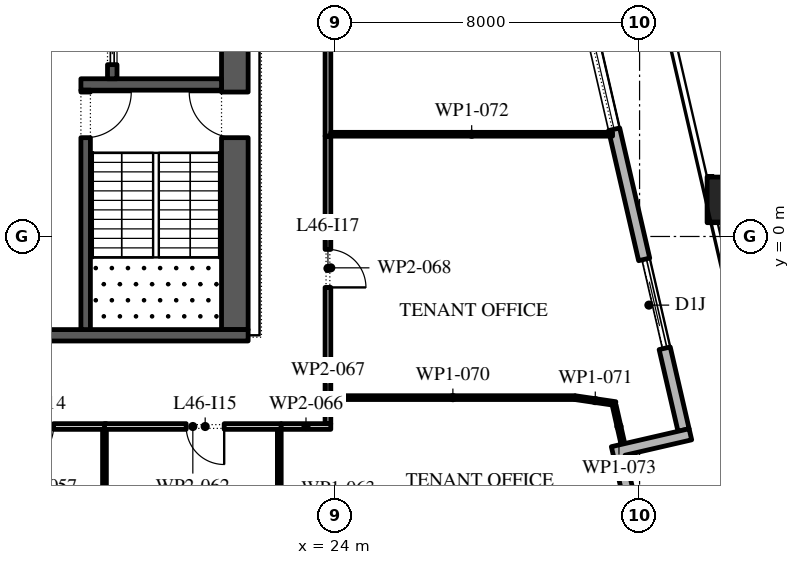
"""IFC4 building model, lengths in metres.
Left out: names, types, materials, properties, quantities, classifications, styles, units other than length and angle.
Written with IfcOpenShell. Run it as: python <this file> out.ifc"""

import sys

from ifc_helpers import new_model, si_unit, direction, frame, frame_2d, origin, origin_2d, place, context, subcontext, project, spatial, polyline, rectangle, outline, extrude, element, fill, save


model = new_model("IFC4")
c1 = context("Model", 3, precision=1e-05, world=origin(), true_north=direction((0.0, 1.0)))
c2 = subcontext(c1, "Body", "Model", "MODEL_VIEW")
j1 = project(units=[si_unit("LENGTHUNIT", "METRE"), si_unit("PLANEANGLEUNIT", "RADIAN")], contexts=[c1])
p1 = place(None, origin())
s1 = spatial("IfcSite", under=j1, at=p1, CompositionType="ELEMENT")
p2 = place(p1, origin())
s2 = spatial("IfcBuilding", under=s1, at=p2, CompositionType="ELEMENT")
p3 = place(p2, frame((0.0, 0.0, 209.4)))
s3 = spatial("IfcBuildingStorey", under=s2, at=p3, CompositionType="ELEMENT", Elevation=209.4)
p4 = place(p3, frame((34.376, 0.963, 0.0), z_axis=(-0.002673604768, 0.011682490397, 0.999928183049), x_axis=(-0.974798272484, -0.223088161862, 0.0)))
e1 = element("IfcColumn", 1, at=p4, inside=s3, PredefinedType="COLUMN", context=c2, shape_type="SweptSolid", body=[
    extrude(rectangle(XDim=1.2, YDim=1.2, at=origin_2d()), origin(), (0.0, 0.0, 1.0), 4.2),
])
p5 = place(p3, frame((33.157, -5.092, 0.0), z_axis=(0.0, 0.0, 1.0), x_axis=(-0.224950279389, 0.974370243697, 0.0)))
e2 = element("IfcWall", 2, at=p5, inside=s3, PredefinedType="STANDARD", context=c2, shape_type="SweptSolid", body=[
    extrude(rectangle(XDim=49.5, YDim=0.3, at=frame_2d((24.75, 0.0))), origin(), (0.0, 0.0, 1.0), 4.0),
])
p6 = place(p5, frame((2.207, 0.0, 0.0)))
e3 = element("IfcOpeningElement", 3, at=p6, cuts=e2, PredefinedType="OPENING", context=c2, shape_type="SweptSolid", body=[
    extrude(rectangle(XDim=2.4, YDim=3.125, at=frame_2d((1.2, 1.562))), frame((0.0, 0.16, 0.0), z_axis=(0.0, -1.0, 0.0), x_axis=(1.0, 0.0, 0.0)), (0.0, 0.0, 1.0), 0.32),
])
p7 = place(p5, frame((8.121, 0.0, 0.45)))
e4 = element("IfcOpeningElement", 4, at=p7, cuts=e2, PredefinedType="OPENING", context=c2, shape_type="SweptSolid", body=[
    extrude(rectangle(XDim=4.5, YDim=2.875, at=frame_2d((2.25, 1.438))), frame((0.0, 0.16, 0.0), z_axis=(0.0, -1.0, 0.0), x_axis=(1.0, 0.0, 0.0)), (0.0, 0.0, 1.0), 0.32),
])
p8 = place(p5, frame((15.236, 0.0, 0.45)))
e5 = element("IfcOpeningElement", 5, at=p8, cuts=e2, PredefinedType="OPENING", context=c2, shape_type="SweptSolid", body=[
    extrude(rectangle(XDim=4.5, YDim=2.875, at=frame_2d((2.25, 1.438))), frame((0.0, 0.16, 0.0), z_axis=(0.0, -1.0, 0.0), x_axis=(1.0, 0.0, 0.0)), (0.0, 0.0, 1.0), 0.32),
])
p9 = place(p5, frame((22.35, 0.0, 0.45)))
e6 = element("IfcOpeningElement", 6, at=p9, cuts=e2, PredefinedType="OPENING", context=c2, shape_type="SweptSolid", body=[
    extrude(rectangle(XDim=4.5, YDim=3.0, at=frame_2d((2.25, 1.5))), frame((0.0, 0.16, 0.0), z_axis=(0.0, -1.0, 0.0), x_axis=(1.0, 0.0, 0.0)), (0.0, 0.0, 1.0), 0.32),
])
p10 = place(p5, frame((30.514, 0.0, 0.0)))
e7 = element("IfcOpeningElement", 7, at=p10, cuts=e2, PredefinedType="OPENING", context=c2, shape_type="SweptSolid", body=[
    extrude(rectangle(XDim=2.4, YDim=3.45, at=frame_2d((1.2, 1.725))), frame((0.0, 0.16, 0.0), z_axis=(0.0, -1.0, 0.0), x_axis=(1.0, 0.0, 0.0)), (0.0, 0.0, 1.0), 0.32),
])
p11 = place(p5, frame((36.579, 0.0, 0.45)))
e8 = element("IfcOpeningElement", 8, at=p11, cuts=e2, PredefinedType="OPENING", context=c2, shape_type="SweptSolid", body=[
    extrude(rectangle(XDim=4.5, YDim=3.05, at=frame_2d((2.25, 1.525))), frame((0.0, 0.16, 0.0), z_axis=(0.0, -1.0, 0.0), x_axis=(1.0, 0.0, 0.0)), (0.0, 0.0, 1.0), 0.32),
])
p12 = place(p5, frame((43.693, 0.0, 0.45)))
e9 = element("IfcOpeningElement", 9, at=p12, cuts=e2, PredefinedType="OPENING", context=c2, shape_type="SweptSolid", body=[
    extrude(rectangle(XDim=4.5, YDim=3.05, at=frame_2d((2.25, 1.525))), frame((0.0, 0.16, 0.0), z_axis=(0.0, -1.0, 0.0), x_axis=(1.0, 0.0, 0.0)), (0.0, 0.0, 1.0), 0.32),
])
p13 = place(p3, origin())
e10 = element("IfcWall", 10, at=p13, inside=s3, PredefinedType="STANDARD", context=c2, shape_type="SweptSolid", body=[
    extrude(outline(polyline([(31.662, -7.285), (31.257, -5.531), (33.303, -5.058), (33.371, -5.351), (31.617, -5.756), (32.022, -7.51), (30.268, -7.914), (30.605, -9.376), (30.313, -9.443), (29.908, -7.69), (31.662, -7.285)])), origin(), (0.0, 0.0, 1.0), 4.0),
])
p14 = place(p3, frame((21.35, -2.45, 0.0), z_axis=(0.0, 0.0, 1.0), x_axis=(0.0, 1.0, 0.0)))
e11 = element("IfcWall", 11, at=p14, inside=s3, PredefinedType="SHEAR", context=c2, shape_type="SweptSolid", body=[
    extrude(rectangle(XDim=27.9, YDim=0.7, at=frame_2d((13.95, 0.0))), origin(), (0.0, 0.0, 1.0), 4.0),
])
p15 = place(p14, frame((5.05, 0.0, 0.0)))
e12 = element("IfcOpeningElement", 12, at=p15, cuts=e11, PredefinedType="OPENING", context=c2, shape_type="SweptSolid", body=[
    extrude(rectangle(XDim=1.2, YDim=2.1, at=frame_2d((0.6, 1.05))), frame((0.0, 0.36, 0.0), z_axis=(0.0, -1.0, 0.0), x_axis=(1.0, 0.0, 0.0)), (0.0, 0.0, 1.0), 0.72),
])
p16 = place(p14, frame((21.65, 0.0, 0.0)))
e13 = element("IfcOpeningElement", 13, at=p16, cuts=e11, PredefinedType="OPENING", context=c2, shape_type="SweptSolid", body=[
    extrude(rectangle(XDim=1.2, YDim=2.1, at=frame_2d((0.6, 1.05))), frame((0.0, 0.36, 0.0), z_axis=(0.0, -1.0, 0.0), x_axis=(1.0, 0.0, 0.0)), (0.0, 0.0, 1.0), 0.72),
])
p17 = place(p3, frame((10.3, -2.6, 0.0), z_axis=(0.0, 0.0, 1.0), x_axis=(1.0, 0.0, 0.0)))
e14 = element("IfcWall", 14, at=p17, inside=s3, PredefinedType="SHEAR", context=c2, shape_type="SweptSolid", body=[
    extrude(rectangle(XDim=11.4, YDim=0.3, at=frame_2d((5.7, 0.0))), origin(), (0.0, 0.0, 1.0), 4.0),
])
p18 = place(p3, frame((17.3, 4.0, 0.0), z_axis=(0.0, 0.0, 1.0), x_axis=(1.0, 0.0, 0.0)))
e15 = element("IfcWall", 15, at=p18, inside=s3, PredefinedType="SHEAR", context=c2, shape_type="SweptSolid", body=[
    extrude(rectangle(XDim=3.7, YDim=0.3, at=frame_2d((1.85, 0.0))), origin(), (0.0, 0.0, 1.0), 4.0),
])
p19 = place(p3, frame((17.425, -2.45, 0.0), z_axis=(0.0, 0.0, 1.0), x_axis=(0.0, 1.0, 0.0)))
e16 = element("IfcWall", 16, at=p19, inside=s3, PredefinedType="SHEAR", context=c2, shape_type="SweptSolid", body=[
    extrude(rectangle(XDim=6.3, YDim=0.25, at=frame_2d((3.15, 0.0))), origin(), (0.0, 0.0, 1.0), 4.0),
])
p20 = place(p19, frame((5.05, 0.0, 0.0)))
e17 = element("IfcOpeningElement", 17, at=p20, cuts=e16, PredefinedType="OPENING", context=c2, shape_type="SweptSolid", body=[
    extrude(rectangle(XDim=1.2, YDim=2.1, at=frame_2d((0.6, 1.05))), frame((0.0, 0.135, 0.0), z_axis=(0.0, -1.0, 0.0), x_axis=(1.0, 0.0, 0.0)), (0.0, 0.0, 1.0), 0.27),
])
p21 = place(p3, frame((18.125, 4.15, 0.0), z_axis=(0.0, 0.0, 1.0), x_axis=(0.0, 1.0, 0.0)))
e18 = element("IfcWall", 18, at=p21, inside=s3, PredefinedType="SHEAR", context=c2, shape_type="SweptSolid", body=[
    extrude(rectangle(XDim=14.7, YDim=0.25, at=frame_2d((7.35, 0.0))), origin(), (0.0, 0.0, 1.0), 4.0),
])
p22 = place(p21, frame((3.446, 0.0, 0.0)))
e19 = element("IfcOpeningElement", 19, at=p22, cuts=e18, PredefinedType="OPENING", context=c2, shape_type="SweptSolid", body=[
    extrude(rectangle(XDim=0.9, YDim=2.1, at=frame_2d((0.45, 1.05))), frame((0.0, 0.135, 0.0), z_axis=(0.0, -1.0, 0.0), x_axis=(1.0, 0.0, 0.0)), (0.0, 0.0, 1.0), 0.27),
])
p23 = place(p21, frame((6.9, 0.0, 0.0)))
e20 = element("IfcOpeningElement", 20, at=p23, cuts=e18, PredefinedType="OPENING", context=c2, shape_type="SweptSolid", body=[
    extrude(rectangle(XDim=0.9, YDim=2.1, at=frame_2d((0.45, 1.05))), frame((0.0, 0.135, 0.0), z_axis=(0.0, -1.0, 0.0), x_axis=(1.0, 0.0, 0.0)), (0.0, 0.0, 1.0), 0.27),
])
p24 = place(p21, frame((10.354, 0.0, 0.0)))
e21 = element("IfcOpeningElement", 21, at=p24, cuts=e18, PredefinedType="OPENING", context=c2, shape_type="SweptSolid", body=[
    extrude(rectangle(XDim=0.9, YDim=2.1, at=frame_2d((0.45, 1.05))), frame((0.0, 0.135, 0.0), z_axis=(0.0, -1.0, 0.0), x_axis=(1.0, 0.0, 0.0)), (0.0, 0.0, 1.0), 0.27),
])
p25 = place(p21, frame((0.371, 0.0, 0.0)))
e22 = element("IfcOpeningElement", 22, at=p25, cuts=e18, PredefinedType="OPENING", context=c2, shape_type="SweptSolid", body=[
    extrude(rectangle(XDim=1.1, YDim=2.1, at=frame_2d((0.55, 1.05))), frame((0.0, 0.135, 0.0), z_axis=(0.0, -1.0, 0.0), x_axis=(1.0, 0.0, 0.0)), (0.0, 0.0, 1.0), 0.27),
])
p26 = place(p21, frame((13.229, 0.0, 0.0)))
e23 = element("IfcOpeningElement", 23, at=p26, cuts=e18, PredefinedType="OPENING", context=c2, shape_type="SweptSolid", body=[
    extrude(rectangle(XDim=1.1, YDim=2.1, at=frame_2d((0.55, 1.05))), frame((0.0, 0.135, 0.0), z_axis=(0.0, -1.0, 0.0), x_axis=(1.0, 0.0, 0.0)), (0.0, 0.0, 1.0), 0.27),
])
p27 = place(p3, frame((17.97, -5.0, 0.0), z_axis=(0.0, 0.0, 1.0), x_axis=(-1.0, 0.0, 0.0)))
e24 = element("IfcWall", 24, at=p27, inside=s3, PredefinedType="PARTITIONING", context=c2, shape_type="SweptSolid", body=[
    extrude(rectangle(XDim=3.49, YDim=0.15, at=frame_2d((1.745, 0.0))), origin(), (0.0, 0.0, 1.0), 4.0),
])
p28 = place(p27, frame((1.39, 0.0, 0.0)))
e25 = element("IfcOpeningElement", 25, at=p28, cuts=e24, PredefinedType="OPENING", context=c2, shape_type="SweptSolid", body=[
    extrude(rectangle(XDim=1.0, YDim=2.1, at=frame_2d((0.5, 1.05))), frame((0.0, 0.085, 0.0), z_axis=(0.0, -1.0, 0.0), x_axis=(1.0, 0.0, 0.0)), (0.0, 0.0, 1.0), 0.17),
])
p29 = place(p3, frame((17.92, -5.075, 0.0), z_axis=(0.0, 0.0, 1.0), x_axis=(0.0, -1.0, 0.0)))
e26 = element("IfcWall", 26, at=p29, inside=s3, PredefinedType="PARTITIONING", context=c2, shape_type="SweptSolid", body=[
    extrude(rectangle(XDim=7.312, YDim=0.1, at=frame_2d((3.656, 0.0))), origin(), (0.0, 0.0, 1.0), 4.0),
])
p30 = place(p3, frame((22.57, -5.0, 0.0), z_axis=(0.0, 0.0, 1.0), x_axis=(-1.0, 0.0, 0.0)))
e27 = element("IfcWall", 27, at=p30, inside=s3, PredefinedType="PARTITIONING", context=c2, shape_type="SweptSolid", body=[
    extrude(rectangle(XDim=4.65, YDim=0.15, at=frame_2d((2.325, 0.0))), origin(), (0.0, 0.0, 1.0), 4.0),
])
p31 = place(p30, frame((1.5, 0.0, 0.0)))
e28 = element("IfcOpeningElement", 28, at=p31, cuts=e27, PredefinedType="OPENING", context=c2, shape_type="SweptSolid", body=[
    extrude(rectangle(XDim=1.0, YDim=2.1, at=frame_2d((0.5, 1.05))), frame((0.0, 0.085, 0.0), z_axis=(0.0, -1.0, 0.0), x_axis=(1.0, 0.0, 0.0)), (0.0, 0.0, 1.0), 0.17),
])
p32 = place(p3, frame((22.52, -5.075, 0.0), z_axis=(0.0, 0.0, 1.0), x_axis=(0.0, -1.0, 0.0)))
e29 = element("IfcWall", 29, at=p32, inside=s3, PredefinedType="PARTITIONING", context=c2, shape_type="SweptSolid", body=[
    extrude(rectangle(XDim=6.25, YDim=0.1, at=frame_2d((3.125, 0.0))), origin(), (0.0, 0.0, 1.0), 4.0),
])
p33 = place(p32, frame((4.125, 0.0, 0.0)))
e30 = element("IfcOpeningElement", 30, at=p33, cuts=e29, PredefinedType="OPENING", context=c2, shape_type="SweptSolid", body=[
    extrude(rectangle(XDim=0.9, YDim=2.1, at=frame_2d((0.45, 1.05))), frame((0.0, 0.06, 0.0), z_axis=(0.0, -1.0, 0.0), x_axis=(1.0, 0.0, 0.0)), (0.0, 0.0, 1.0), 0.12),
])
p34 = place(p3, frame((23.875, -5.0, 0.0), z_axis=(0.0, 0.0, 1.0), x_axis=(-1.0, 0.0, 0.0)))
e31 = element("IfcWall", 31, at=p34, inside=s3, PredefinedType="PARTITIONING", context=c2, shape_type="SweptSolid", body=[
    extrude(rectangle(XDim=1.305, YDim=0.15, at=frame_2d((0.652, 0.0))), origin(), (0.0, 0.0, 1.0), 4.0),
])
p35 = place(p3, frame((23.8, -4.29, 0.0), z_axis=(0.0, 0.0, 1.0), x_axis=(0.0, -1.0, 0.0)))
e32 = element("IfcWall", 32, at=p35, inside=s3, PredefinedType="PARTITIONING", context=c2, shape_type="SweptSolid", body=[
    extrude(rectangle(XDim=0.635, YDim=0.15, at=frame_2d((0.317, 0.0))), origin(), (0.0, 0.0, 1.0), 4.0),
])
p36 = place(p3, frame((23.8, 2.64, 0.0), z_axis=(0.0, 0.0, 1.0), x_axis=(0.0, -1.0, 0.0)))
e33 = element("IfcWall", 33, at=p36, inside=s3, PredefinedType="PARTITIONING", context=c2, shape_type="SweptSolid", body=[
    extrude(rectangle(XDim=6.93, YDim=0.15, at=frame_2d((3.465, 0.0))), origin(), (0.0, 0.0, 1.0), 4.0),
])
p37 = place(p36, frame((2.98, 0.0, 0.0)))
e34 = element("IfcOpeningElement", 34, at=p37, cuts=e33, PredefinedType="OPENING", context=c2, shape_type="SweptSolid", body=[
    extrude(rectangle(XDim=1.0, YDim=2.1, at=frame_2d((0.5, 1.05))), frame((0.0, 0.085, 0.0), z_axis=(0.0, -1.0, 0.0), x_axis=(1.0, 0.0, 0.0)), (0.0, 0.0, 1.0), 0.17),
])
p38 = place(p3, frame((23.8, 27.2, 0.0), z_axis=(0.0, 0.0, 1.0), x_axis=(0.0, -1.0, 0.0)))
e35 = element("IfcWall", 35, at=p38, inside=s3, PredefinedType="PARTITIONING", context=c2, shape_type="SweptSolid", body=[
    extrude(rectangle(XDim=24.56, YDim=0.15, at=frame_2d((12.28, 0.0))), origin(), (0.0, 0.0, 1.0), 4.0),
])
p39 = place(p38, frame((14.11, 0.0, 0.0)))
e36 = element("IfcOpeningElement", 36, at=p39, cuts=e35, PredefinedType="OPENING", context=c2, shape_type="SweptSolid", body=[
    extrude(rectangle(XDim=1.0, YDim=2.1, at=frame_2d((0.5, 1.05))), frame((0.0, 0.085, 0.0), z_axis=(0.0, -1.0, 0.0), x_axis=(1.0, 0.0, 0.0)), (0.0, 0.0, 1.0), 0.17),
])
p40 = place(p3, frame((30.3, -4.24, 0.0), z_axis=(0.0, 0.0, 1.0), x_axis=(-1.0, 0.0, 0.0)))
e37 = element("IfcWall", 37, at=p40, inside=s3, PredefinedType="PARTITIONING", context=c2, shape_type="SweptSolid", body=[
    extrude(rectangle(XDim=6.425, YDim=0.1, at=frame_2d((3.212, 0.0))), origin(), (0.0, 0.0, 1.0), 4.0),
])
p41 = place(p3, frame((31.369, -4.397, 0.0), z_axis=(0.0, 0.0, 1.0), x_axis=(-0.989385908309, 0.145311817963, 0.0)))
e38 = element("IfcWall", 38, at=p41, inside=s3, PredefinedType="PARTITIONING", context=c2, shape_type="SweptSolid", body=[
    extrude(rectangle(XDim=1.08, YDim=0.1, at=frame_2d((0.54, 0.0))), origin(), (0.0, 0.0, 1.0), 4.0),
])
p42 = place(p3, frame((31.289, 2.69, 0.0), z_axis=(0.0, 0.0, 1.0), x_axis=(-1.0, 0.0, 0.0)))
e39 = element("IfcWall", 39, at=p42, inside=s3, PredefinedType="PARTITIONING", context=c2, shape_type="SweptSolid", body=[
    extrude(rectangle(XDim=7.414, YDim=0.1, at=frame_2d((3.707, 0.0))), origin(), (0.0, 0.0, 1.0), 4.0),
])
p43 = place(p3, frame((31.584, -5.558, 0.0), z_axis=(0.0, 0.0, 1.0), x_axis=(-0.220443734992, 0.975399692281, 0.0)))
e40 = element("IfcWall", 40, at=p43, inside=s3, PredefinedType="PARTITIONING", context=c2, shape_type="SweptSolid", body=[
    extrude(rectangle(XDim=1.147, YDim=0.1, at=frame_2d((0.574, 0.0))), origin(), (0.0, 0.0, 1.0), 4.0),
])
p44 = place(p6, origin())
e41 = element("IfcDoor", 41, at=p44, inside=s3, OperationType="DOUBLE_DOOR_SLIDING", PredefinedType="DOOR", context=c2, shape_type="SweptSolid", body=[
    extrude(rectangle(XDim=2.4, YDim=3.125, at=frame_2d((1.2, 1.562))), frame((0.0, 0.025, 0.0), z_axis=(0.0, -1.0, 0.0), x_axis=(1.0, 0.0, 0.0)), (0.0, 0.0, 1.0), 0.05),
])
fill(e3, e41)
p45 = place(p7, origin())
e42 = element("IfcWindow", 42, at=p45, inside=s3, PartitioningType="DOUBLE_PANEL_VERTICAL", PredefinedType="WINDOW", context=c2, shape_type="SweptSolid", body=[
    extrude(rectangle(XDim=4.5, YDim=2.875, at=frame_2d((2.25, 1.438))), frame((0.0, 0.03, 0.0), z_axis=(0.0, -1.0, 0.0), x_axis=(1.0, 0.0, 0.0)), (0.0, 0.0, 1.0), 0.06),
])
fill(e4, e42)
p46 = place(p25, origin())
e43 = element("IfcDoor", 43, at=p46, inside=s3, OperationType="SLIDING_TO_LEFT", PredefinedType="DOOR", context=c2, shape_type="SweptSolid", body=[
    extrude(rectangle(XDim=1.1, YDim=2.1, at=frame_2d((0.55, 1.05))), frame((0.0, 0.025, 0.0), z_axis=(0.0, -1.0, 0.0), x_axis=(1.0, 0.0, 0.0)), (0.0, 0.0, 1.0), 0.05),
])
fill(e22, e43)
p47 = place(p20, frame((1.2, 0.0, 0.0), z_axis=(0.0, 0.0, 1.0), x_axis=(-1.0, 0.0, 0.0)))
e44 = element("IfcDoor", 44, at=p47, inside=s3, OperationType="SINGLE_SWING_RIGHT", PredefinedType="DOOR", context=c2, shape_type="SweptSolid", body=[
    extrude(rectangle(XDim=1.2, YDim=2.1, at=frame_2d((0.6, 1.05))), frame((0.0, 0.025, 0.0), z_axis=(0.0, -1.0, 0.0), x_axis=(1.0, 0.0, 0.0)), (0.0, 0.0, 1.0), 0.05),
])
fill(e17, e44)
p48 = place(p15, origin())
e45 = element("IfcDoor", 45, at=p48, inside=s3, OperationType="SINGLE_SWING_LEFT", PredefinedType="DOOR", context=c2, shape_type="SweptSolid", body=[
    extrude(rectangle(XDim=1.2, YDim=2.1, at=frame_2d((0.6, 1.05))), frame((0.0, 0.025, 0.0), z_axis=(0.0, -1.0, 0.0), x_axis=(1.0, 0.0, 0.0)), (0.0, 0.0, 1.0), 0.05),
])
fill(e12, e45)
p49 = place(p28, origin())
e46 = element("IfcDoor", 46, at=p49, inside=s3, OperationType="SINGLE_SWING_LEFT", PredefinedType="DOOR", context=c2, shape_type="SweptSolid", body=[
    extrude(rectangle(XDim=1.0, YDim=2.1, at=frame_2d((0.5, 1.05))), frame((0.0, 0.025, 0.0), z_axis=(0.0, -1.0, 0.0), x_axis=(1.0, 0.0, 0.0)), (0.0, 0.0, 1.0), 0.05),
])
fill(e25, e46)
p50 = place(p31, origin())
e47 = element("IfcDoor", 47, at=p50, inside=s3, OperationType="SINGLE_SWING_RIGHT", PredefinedType="DOOR", context=c2, shape_type="SweptSolid", body=[
    extrude(rectangle(XDim=1.0, YDim=2.1, at=frame_2d((0.5, 1.05))), frame((0.0, 0.025, 0.0), z_axis=(0.0, -1.0, 0.0), x_axis=(1.0, 0.0, 0.0)), (0.0, 0.0, 1.0), 0.05),
])
fill(e28, e47)
p51 = place(p37, origin())
e48 = element("IfcDoor", 48, at=p51, inside=s3, OperationType="SINGLE_SWING_LEFT", PredefinedType="DOOR", context=c2, shape_type="SweptSolid", body=[
    extrude(rectangle(XDim=1.0, YDim=2.1, at=frame_2d((0.5, 1.05))), frame((0.0, 0.025, 0.0), z_axis=(0.0, -1.0, 0.0), x_axis=(1.0, 0.0, 0.0)), (0.0, 0.0, 1.0), 0.05),
])
fill(e34, e48)
save(model, sys.argv[1])
